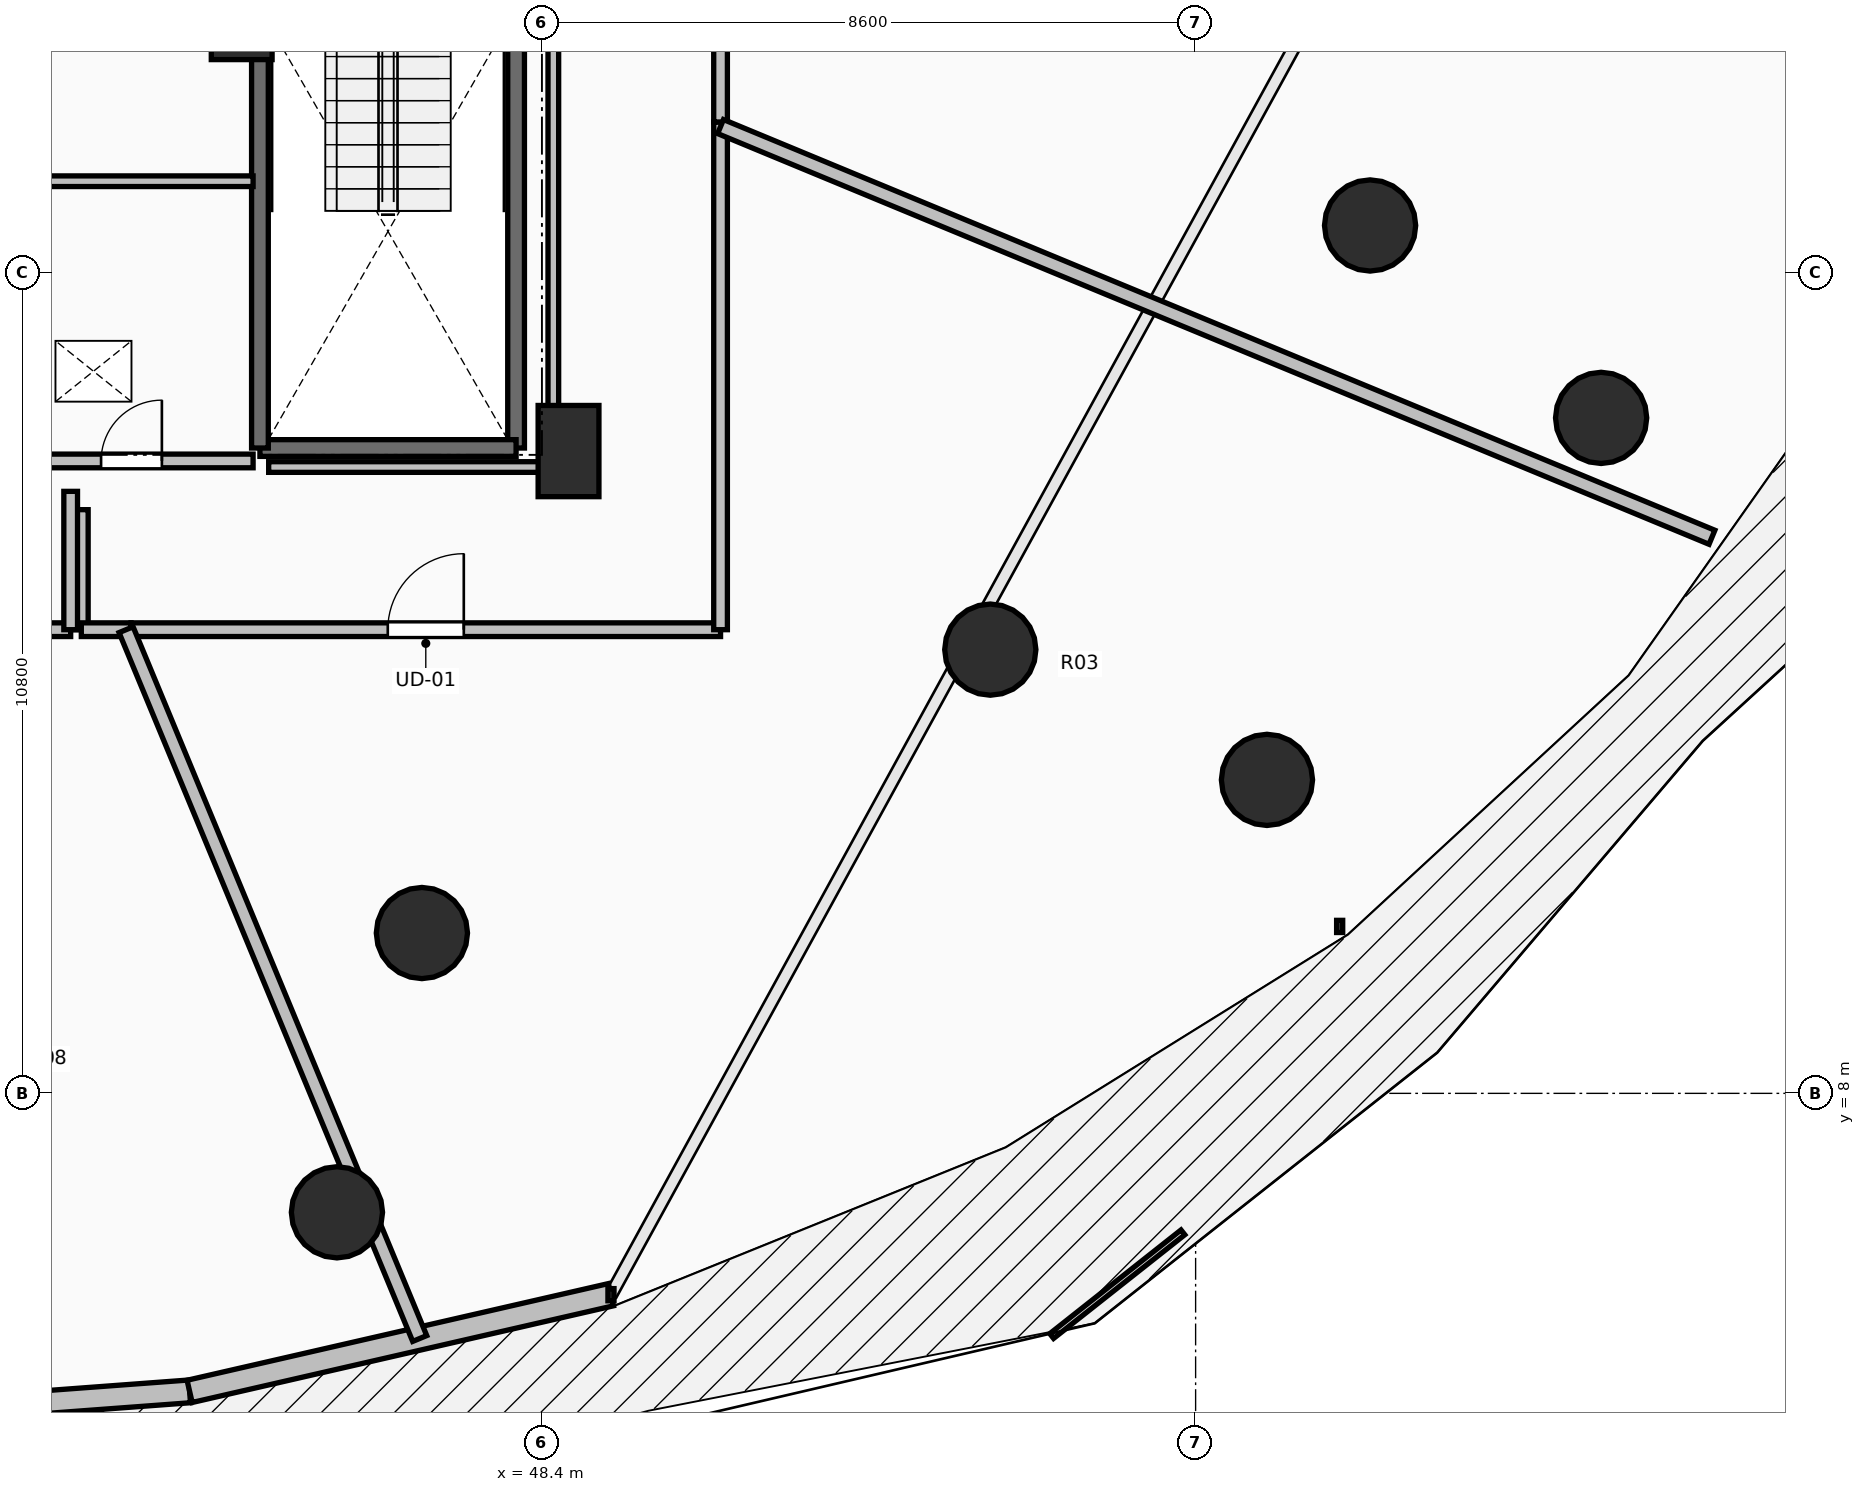
"""IFC4 building model, lengths in metres.
Left out: names, types, materials, properties, quantities, classifications, styles, units other than length and angle.
Written with IfcOpenShell. Run it as: python <this file> out.ifc"""

import sys

from ifc_helpers import new_model, si_unit, direction, frame, frame_2d, origin, origin_2d, place, context, subcontext, project, spatial, rectangle, circle, extrude, element, fill, save


model = new_model("IFC4")
c1 = context("Model", 3, precision=1e-05, world=origin(), true_north=direction((0.0, 1.0)))
c2 = subcontext(c1, "Body", "Model", "MODEL_VIEW")
j1 = project(units=[si_unit("LENGTHUNIT", "METRE"), si_unit("PLANEANGLEUNIT", "RADIAN")], contexts=[c1])
p1 = place(None, origin())
s1 = spatial("IfcSite", under=j1, at=p1, CompositionType="ELEMENT")
p2 = place(p1, origin())
s2 = spatial("IfcBuilding", under=s1, at=p2, CompositionType="ELEMENT")
p3 = place(p2, frame((0.0, 0.0, 48.5)))
s3 = spatial("IfcBuildingStorey", under=s2, at=p3, CompositionType="ELEMENT", Elevation=48.5)
for number, where, z_axis, x_axis in (
    (1, (46.821, 10.109, 0.0), (0.0, 0.0, 1.0), (0.383, -0.924, 0.0)),
    (2, (54.299, 13.838, 0.0), (0.0, 0.0, 1.0), (0.707, -0.707, 0.0)),
    (3, (59.295, 19.418, 0.0), (0.0, 0.0, 1.0), (0.924, -0.383, 0.0)),
    (4, (45.703, 6.435, 0.0), (0.0, 0.0, 1.0), (0.383, -0.924, 0.0)),
    (5, (57.939, 12.124, 0.0), (0.0, 0.0, 1.0), (0.707, -0.707, 0.0)),
    (6, (62.335, 16.886, 0.0), (0.0, 0.0, 1.0), (0.924, -0.383, 0.0)),
):
    element("IfcColumn", number, at=place(p3, frame(where, z_axis=z_axis, x_axis=x_axis)), inside=s3, PredefinedType="COLUMN", context=c2, shape_type="SweptSolid", body=[
        extrude(circle(Radius=0.6, at=origin_2d()), origin(), (0.0, 0.0, 1.0), 3.5),
    ])
for number, where, z_axis, x_axis in (
    (7, (48.75, 16.45, 0.0), (0.0, 0.0, 1.0), (1.0, 0.0, 0.0)),
    (8, (44.45, 22.2, 0.0), (0.0, 0.0, 1.0), (1.0, 0.0, 0.0)),
):
    element("IfcColumn", number, at=place(p3, frame(where, z_axis=z_axis, x_axis=x_axis)), inside=s3, PredefinedType="PILASTER", context=c2, shape_type="SweptSolid", body=[
        extrude(rectangle(XDim=0.8, YDim=1.2, at=origin_2d()), origin(), (0.0, 0.0, 1.0), 3.5),
    ])
p4 = place(p3, frame((38.0, 3.65, 0.0), z_axis=(0.0, 0.0, 1.0), x_axis=(0.99723690101, 0.074287032943, 0.0)))
e9 = element("IfcWall", 9, at=p4, inside=s3, PredefinedType="STANDARD", context=c2, shape_type="SweptSolid", body=[
    extrude(rectangle(XDim=5.781, YDim=0.3, at=frame_2d((2.89, 0.0))), origin(), (0.0, 0.0, 1.0), 3.24),
])
p5 = place(p4, frame((2.09, 0.0, 0.0)))
e10 = element("IfcOpeningElement", 10, at=p5, cuts=e9, PredefinedType="OPENING", context=c2, shape_type="SweptSolid", body=[
    extrude(rectangle(XDim=1.6, YDim=2.3, at=frame_2d((0.8, 1.15))), frame((0.0, 0.165, 0.0), z_axis=(0.0, -1.0, 0.0), x_axis=(1.0, 0.0, 0.0)), (0.0, 0.0, 1.0), 0.33),
])
p6 = place(p3, frame((43.765, 4.079, 0.0), z_axis=(0.0, 0.0, 1.0), x_axis=(0.974671141646, 0.223642942305, 0.0)))
e11 = element("IfcWall", 11, at=p6, inside=s3, PredefinedType="STANDARD", context=c2, shape_type="SweptSolid", body=[
    extrude(rectangle(XDim=5.688, YDim=0.3, at=frame_2d((2.844, 0.0))), origin(), (0.0, 0.0, 1.0), 3.24),
])
p7 = place(p3, frame((48.06, 23.91, 0.0), z_axis=(0.0, 0.0, 1.0), x_axis=(0.0, -1.0, 0.0)))
e12 = element("IfcWall", 12, at=p7, inside=s3, PredefinedType="SOLIDWALL", context=c2, shape_type="SweptSolid", body=[
    extrude(rectangle(XDim=7.42, YDim=0.22, at=frame_2d((3.71, 0.0))), origin(), (0.0, 0.0, 1.0), 3.24),
])
p8 = place(p3, frame((48.06, 16.49, 0.0), z_axis=(0.0, 0.0, 1.0), x_axis=(-1.0, 0.0, 0.0)))
e13 = element("IfcWall", 13, at=p8, inside=s3, PredefinedType="SOLIDWALL", context=c2, shape_type="SweptSolid", body=[
    extrude(rectangle(XDim=3.37, YDim=0.22, at=frame_2d((1.685, 0.0))), origin(), (0.0, 0.0, 1.0), 3.24),
])
p9 = place(p3, frame((44.69, 16.49, 0.0), z_axis=(0.0, 0.0, 1.0), x_axis=(0.0, 1.0, 0.0)))
e14 = element("IfcWall", 14, at=p9, inside=s3, PredefinedType="SOLIDWALL", context=c2, shape_type="SweptSolid", body=[
    extrude(rectangle(XDim=7.42, YDim=0.22, at=frame_2d((3.71, 0.0))), origin(), (0.0, 0.0, 1.0), 3.24),
])
p10 = place(p3, frame((44.6, 20.0, 0.0), z_axis=(0.0, 0.0, 1.0), x_axis=(-1.0, 0.0, 0.0)))
e15 = element("IfcWall", 15, at=p10, inside=s3, PredefinedType="PARTITIONING", context=c2, shape_type="SweptSolid", body=[
    extrude(rectangle(XDim=3.2, YDim=0.14, at=frame_2d((1.6, 0.0))), origin(), (0.0, 0.0, 1.0), 3.24),
])
p11 = place(p3, frame((41.4, 16.32, 0.0), z_axis=(0.0, 0.0, 1.0), x_axis=(1.0, 0.0, 0.0)))
e16 = element("IfcWall", 16, at=p11, inside=s3, PredefinedType="PARTITIONING", context=c2, shape_type="SweptSolid", body=[
    extrude(rectangle(XDim=3.2, YDim=0.18, at=frame_2d((1.6, 0.0))), origin(), (0.0, 0.0, 1.0), 3.24),
])
p12 = place(p11, frame((1.2, 0.0, 0.0)))
e17 = element("IfcOpeningElement", 17, at=p12, cuts=e16, PredefinedType="OPENING", context=c2, shape_type="SweptSolid", body=[
    extrude(rectangle(XDim=0.8, YDim=2.05, at=frame_2d((0.4, 1.025))), frame((0.0, 0.105, 0.0), z_axis=(0.0, -1.0, 0.0), x_axis=(1.0, 0.0, 0.0)), (0.0, 0.0, 1.0), 0.21),
])
p13 = place(p3, frame((42.34, 15.679, 0.0), z_axis=(0.0, 0.0, 1.0), x_axis=(0.0, -1.0, 0.0)))
e18 = element("IfcWall", 18, at=p13, inside=s3, PredefinedType="PARTITIONING", context=c2, shape_type="SweptSolid", body=[
    extrude(rectangle(XDim=1.579, YDim=0.18, at=frame_2d((0.79, 0.0))), origin(), (0.0, 0.0, 1.0), 3.24),
])
p14 = place(p3, frame((42.34, 14.1, 0.0), z_axis=(0.0, 0.0, 1.0), x_axis=(1.0, 0.0, 0.0)))
e19 = element("IfcWall", 19, at=p14, inside=s3, PredefinedType="PARTITIONING", context=c2, shape_type="SweptSolid", body=[
    extrude(rectangle(XDim=0.654, YDim=0.18, at=frame_2d((0.327, 0.0))), origin(), (0.0, 0.0, 1.0), 3.24),
])
p15 = place(p3, frame((38.689, 14.1, 0.0), z_axis=(0.0, 0.0, 1.0), x_axis=(1.0, 0.0, 0.0)))
e20 = element("IfcWall", 20, at=p15, inside=s3, PredefinedType="PARTITIONING", context=c2, shape_type="SweptSolid", body=[
    extrude(rectangle(XDim=3.511, YDim=0.18, at=frame_2d((1.755, 0.0))), origin(), (0.0, 0.0, 1.0), 3.24),
])
p16 = place(p15, frame((1.23, 0.0, 0.0)))
e21 = element("IfcOpeningElement", 21, at=p16, cuts=e20, PredefinedType="OPENING", context=c2, shape_type="SweptSolid", body=[
    extrude(rectangle(XDim=1.05, YDim=2.2, at=frame_2d((0.525, 1.1))), frame((0.0, 0.105, 0.0), z_axis=(0.0, -1.0, 0.0), x_axis=(1.0, 0.0, 0.0)), (0.0, 0.0, 1.0), 0.21),
])
p17 = place(p3, frame((42.2, 14.1, 0.0), z_axis=(0.0, 0.0, 1.0), x_axis=(0.0, 1.0, 0.0)))
e22 = element("IfcWall", 22, at=p17, inside=s3, PredefinedType="PARTITIONING", context=c2, shape_type="SweptSolid", body=[
    extrude(rectangle(XDim=1.82, YDim=0.18, at=frame_2d((0.91, 0.0))), origin(), (0.0, 0.0, 1.0), 3.24),
])
p18 = place(p3, frame((42.994, 14.1, 0.0), z_axis=(0.0, 0.0, 1.0), x_axis=(1.0, 0.0, 0.0)))
e23 = element("IfcWall", 23, at=p18, inside=s3, PredefinedType="PARTITIONING", context=c2, shape_type="SweptSolid", body=[
    extrude(rectangle(XDim=7.756, YDim=0.18, at=frame_2d((3.878, 0.0))), origin(), (0.0, 0.0, 1.0), 2.432),
])
p19 = place(p18, frame((3.378, 0.0, 0.0)))
e24 = element("IfcOpeningElement", 24, at=p19, cuts=e23, PredefinedType="OPENING", context=c2, shape_type="SweptSolid", body=[
    extrude(rectangle(XDim=1.0, YDim=2.15, at=frame_2d((0.5, 1.075))), frame((0.0, 0.105, 0.0), z_axis=(0.0, -1.0, 0.0), x_axis=(1.0, 0.0, 0.0)), (0.0, 0.0, 1.0), 0.21),
])
p20 = place(p3, frame((50.75, 14.1, 0.0), z_axis=(0.0, 0.0, 1.0), x_axis=(0.0, 1.0, 0.0)))
e25 = element("IfcWall", 25, at=p20, inside=s3, PredefinedType="PARTITIONING", context=c2, shape_type="SweptSolid", body=[
    extrude(rectangle(XDim=6.679, YDim=0.18, at=frame_2d((3.339, 0.0))), origin(), (0.0, 0.0, 1.0), 2.432),
])
p21 = place(p3, frame((50.75, 20.779, 0.0), z_axis=(0.0, 0.0, 1.0), x_axis=(0.0, 1.0, 0.0)))
e26 = element("IfcWall", 26, at=p21, inside=s3, PredefinedType="PARTITIONING", context=c2, shape_type="SweptSolid", body=[
    extrude(rectangle(XDim=10.302, YDim=0.18, at=frame_2d((5.151, 0.0))), origin(), (0.0, 0.0, 1.0), 2.432),
])
p22 = place(p21, frame((4.651, 0.0, 0.0)))
e27 = element("IfcOpeningElement", 27, at=p22, cuts=e26, PredefinedType="OPENING", context=c2, shape_type="SweptSolid", body=[
    extrude(rectangle(XDim=1.0, YDim=2.15, at=frame_2d((0.5, 1.075))), frame((0.0, 0.105, 0.0), z_axis=(0.0, -1.0, 0.0), x_axis=(1.0, 0.0, 0.0)), (0.0, 0.0, 1.0), 0.21),
])
p23 = place(p3, frame((46.792, 4.775, 0.0), z_axis=(0.0, 0.0, 1.0), x_axis=(-0.382718503749, 0.923865004689, 0.0)))
e28 = element("IfcWall", 28, at=p23, inside=s3, PredefinedType="PARTITIONING", context=c2, shape_type="SweptSolid", body=[
    extrude(rectangle(XDim=10.094, YDim=0.2, at=frame_2d((5.047, 0.0))), origin(), (0.0, 0.0, 1.0), 2.432),
])
p24 = place(p3, frame((63.793, 15.316, 0.0), z_axis=(0.0, 0.0, 1.0), x_axis=(-0.923866969846, 0.382713759914, 0.0)))
e29 = element("IfcWall", 29, at=p24, inside=s3, PredefinedType="PARTITIONING", context=c2, shape_type="SweptSolid", body=[
    extrude(rectangle(XDim=14.118, YDim=0.2, at=frame_2d((7.059, 0.0))), origin(), (0.0, 0.0, 1.0), 2.624),
])
p25 = place(p3, frame((48.55, 23.754, 0.0), z_axis=(0.0, 0.0, 1.0), x_axis=(0.0, -1.0, 0.0)))
e30 = element("IfcWall", 30, at=p25, inside=s3, PredefinedType="PARTITIONING", context=c2, shape_type="SweptSolid", body=[
    extrude(rectangle(XDim=7.514, YDim=0.14, at=frame_2d((3.757, 0.0))), origin(), (0.0, 0.0, 1.0), 2.432),
])
p26 = place(p3, frame((48.55, 16.24, 0.0), z_axis=(0.0, 0.0, 1.0), x_axis=(-1.0, 0.0, 0.0)))
e31 = element("IfcWall", 31, at=p26, inside=s3, PredefinedType="PARTITIONING", context=c2, shape_type="SweptSolid", body=[
    extrude(rectangle(XDim=3.745, YDim=0.14, at=frame_2d((1.873, 0.0))), origin(), (0.0, 0.0, 1.0), 2.432),
])
p27 = place(p12, origin())
e32 = element("IfcDoor", 32, at=p27, inside=s3, OperationType="SINGLE_SWING_RIGHT", PredefinedType="DOOR", context=c2, shape_type="SweptSolid", body=[
    extrude(rectangle(XDim=0.8, YDim=2.05, at=frame_2d((0.4, 1.025))), frame((0.0, 0.025, 0.0), z_axis=(0.0, -1.0, 0.0), x_axis=(1.0, 0.0, 0.0)), (0.0, 0.0, 1.0), 0.05),
])
fill(e17, e32)
p28 = place(p19, origin())
e33 = element("IfcDoor", 33, at=p28, inside=s3, OperationType="SINGLE_SWING_RIGHT", PredefinedType="DOOR", context=c2, shape_type="SweptSolid", body=[
    extrude(rectangle(XDim=1.0, YDim=2.15, at=frame_2d((0.5, 1.075))), frame((0.0, 0.025, 0.0), z_axis=(0.0, -1.0, 0.0), x_axis=(1.0, 0.0, 0.0)), (0.0, 0.0, 1.0), 0.05),
])
fill(e24, e33)
save(model, sys.argv[1])
